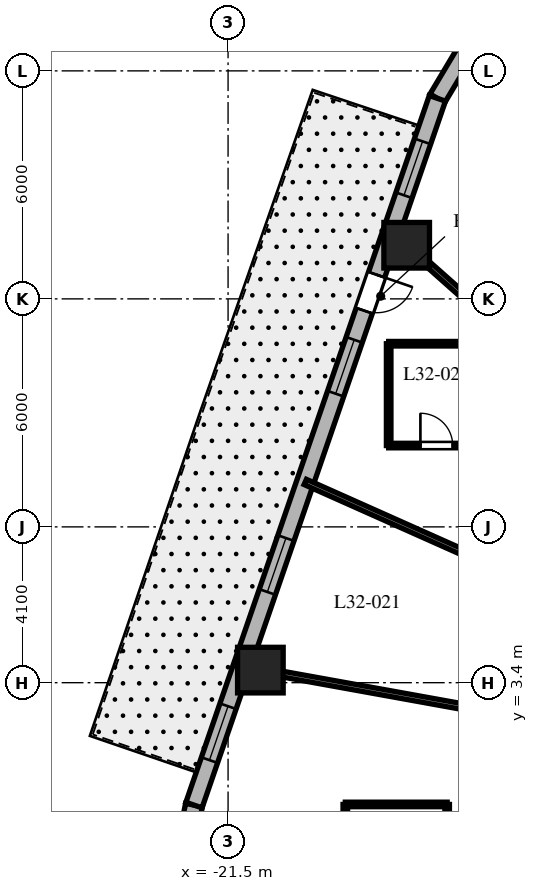
"""IFC4 building model, lengths in metres.
Left out: names, types, materials, properties, quantities, classifications, styles, units other than length and angle.
Written with IfcOpenShell. Run it as: python <this file> out.ifc"""

import sys

from ifc_helpers import new_model, si_unit, direction, frame, frame_2d, origin, origin_2d, place, context, subcontext, project, spatial, rectangle, extrude, element, fill, save


model = new_model("IFC4")
c1 = context("Model", 3, precision=1e-05, world=origin(), true_north=direction((0.0, 1.0)))
c2 = subcontext(c1, "Body", "Model", "MODEL_VIEW")
j1 = project(units=[si_unit("LENGTHUNIT", "METRE"), si_unit("PLANEANGLEUNIT", "RADIAN")], contexts=[c1])
p1 = place(None, origin())
s1 = spatial("IfcSite", under=j1, at=p1, CompositionType="ELEMENT")
p2 = place(p1, origin())
s2 = spatial("IfcBuilding", under=s1, at=p2, CompositionType="ELEMENT")
p3 = place(p2, frame((0.0, 0.0, 132.1)))
s3 = spatial("IfcBuildingStorey", under=s2, at=p3, CompositionType="ELEMENT", Elevation=132.1)
for number, where, z_axis, x_axis in (
    (1, (-16.8, 14.911, 0.0), (0.0, 0.0, 1.0), (1.0, 0.0, 0.0)),
    (2, (-20.65, 3.731, 0.0), (0.0, 0.0, 1.0), (1.0, 0.0, 0.0)),
):
    element("IfcColumn", number, at=place(p3, frame(where, z_axis=z_axis, x_axis=x_axis)), inside=s3, PredefinedType="COLUMN", context=c2, shape_type="SweptSolid", body=[
        extrude(rectangle(XDim=1.2, YDim=1.2, at=origin_2d()), origin(), (0.0, 0.0, 1.0), 3.7),
    ])
p4 = place(p3, frame((-15.272, 19.984, 0.0), z_axis=(0.0, 0.0, 1.0), x_axis=(-0.512579347361, -0.858639862025, 0.0)))
e3 = element("IfcWall", 3, at=p4, inside=s3, PredefinedType="SOLIDWALL", context=c2, shape_type="SweptSolid", body=[
    extrude(rectangle(XDim=1.406, YDim=0.45, at=frame_2d((0.703, 0.0))), origin(), (0.0, 0.0, 1.0), 3.4),
])
p5 = place(p3, frame((-22.397, 0.179, 0.0), z_axis=(0.0, 0.0, 1.0), x_axis=(-0.199313589404, -0.979935759669, 0.0)))
e4 = element("IfcWall", 4, at=p5, inside=s3, PredefinedType="SOLIDWALL", context=c2, shape_type="SweptSolid", body=[
    extrude(rectangle(XDim=0.896, YDim=0.45, at=frame_2d((0.448, 0.0))), origin(), (0.0, 0.0, 1.0), 3.4),
])
p6 = place(p3, frame((-15.992, 18.777, 0.0), z_axis=(0.0, 0.0, 1.0), x_axis=(-0.325606988926, -0.945505202927, 0.0)))
e5 = element("IfcWall", 5, at=p6, inside=s3, PredefinedType="SOLIDWALL", context=c2, shape_type="SweptSolid", body=[
    extrude(rectangle(XDim=19.669, YDim=0.45, at=frame_2d((9.835, 0.0))), origin(), (0.0, 0.0, 1.0), 3.4),
])
p7 = place(p6, frame((4.909, 0.0, 0.0)))
e6 = element("IfcOpeningElement", 6, at=p7, cuts=e5, PredefinedType="OPENING", context=c2, shape_type="SweptSolid", body=[
    extrude(rectangle(XDim=1.0, YDim=2.15, at=frame_2d((0.5, 1.075))), frame((0.0, 0.235, 0.0), z_axis=(0.0, -1.0, 0.0), x_axis=(1.0, 0.0, 0.0)), (0.0, 0.0, 1.0), 0.47),
])
p8 = place(p6, frame((1.197, 0.0, 0.8)))
e7 = element("IfcOpeningElement", 7, at=p8, cuts=e5, PredefinedType="OPENING", context=c2, shape_type="SweptSolid", body=[
    extrude(rectangle(XDim=1.5, YDim=1.8, at=frame_2d((0.75, 0.9))), frame((0.0, 0.235, 0.0), z_axis=(0.0, -1.0, 0.0), x_axis=(1.0, 0.0, 0.0)), (0.0, 0.0, 1.0), 0.47),
])
p9 = place(p6, frame((6.72, 0.0, 0.8)))
e8 = element("IfcOpeningElement", 8, at=p9, cuts=e5, PredefinedType="OPENING", context=c2, shape_type="SweptSolid", body=[
    extrude(rectangle(XDim=1.5, YDim=1.8, at=frame_2d((0.75, 0.9))), frame((0.0, 0.235, 0.0), z_axis=(0.0, -1.0, 0.0), x_axis=(1.0, 0.0, 0.0)), (0.0, 0.0, 1.0), 0.47),
])
p10 = place(p6, frame((12.238, 0.0, 0.8)))
e9 = element("IfcOpeningElement", 9, at=p10, cuts=e5, PredefinedType="OPENING", context=c2, shape_type="SweptSolid", body=[
    extrude(rectangle(XDim=1.5, YDim=1.8, at=frame_2d((0.75, 0.9))), frame((0.0, 0.235, 0.0), z_axis=(0.0, -1.0, 0.0), x_axis=(1.0, 0.0, 0.0)), (0.0, 0.0, 1.0), 0.47),
])
p11 = place(p6, frame((16.918, 0.0, 0.8)))
e10 = element("IfcOpeningElement", 10, at=p11, cuts=e5, PredefinedType="OPENING", context=c2, shape_type="SweptSolid", body=[
    extrude(rectangle(XDim=1.5, YDim=1.8, at=frame_2d((0.75, 0.9))), frame((0.0, 0.235, 0.0), z_axis=(0.0, -1.0, 0.0), x_axis=(1.0, 0.0, 0.0)), (0.0, 0.0, 1.0), 0.47),
])
p12 = place(p3, frame((-11.098, 9.85, 0.0), z_axis=(0.0, 0.0, 1.0), x_axis=(-0.747904295103, 0.663806572253, 0.0)))
e11 = element("IfcWall", 11, at=p12, inside=s3, PredefinedType="PARTITIONING", context=c2, shape_type="SweptSolid", body=[
    extrude(rectangle(XDim=8.16, YDim=0.15, at=frame_2d((4.08, 0.0))), origin(), (0.0, 0.0, 1.0), 2.54),
])
p13 = place(p3, frame((-11.35, 5.062, 0.0), z_axis=(0.0, 0.0, 1.0), x_axis=(-0.91329663997, 0.407295037312, 0.0)))
e12 = element("IfcWall", 12, at=p13, inside=s3, PredefinedType="PARTITIONING", context=c2, shape_type="SweptSolid", body=[
    extrude(rectangle(XDim=8.889, YDim=0.15, at=frame_2d((4.445, 0.0))), origin(), (0.0, 0.0, 1.0), 2.54),
])
p14 = place(p3, frame((-11.35, 2.051, 0.0), z_axis=(0.0, 0.0, 1.0), x_axis=(-0.984068313063, 0.177790762484, 0.0)))
e13 = element("IfcWall", 13, at=p14, inside=s3, PredefinedType="PARTITIONING", context=c2, shape_type="SweptSolid", body=[
    extrude(rectangle(XDim=9.951, YDim=0.15, at=frame_2d((4.976, 0.0))), origin(), (0.0, 0.0, 1.0), 2.54),
])
p15 = place(p3, frame((-17.274, 9.64, 0.0), z_axis=(0.0, 0.0, 1.0), x_axis=(1.0, 0.0, 0.0)))
e14 = element("IfcWall", 14, at=p15, inside=s3, PredefinedType="PARTITIONING", context=c2, shape_type="SweptSolid", body=[
    extrude(rectangle(XDim=2.52, YDim=0.12, at=frame_2d((1.26, 0.0))), origin(), (0.0, 0.0, 1.0), 2.972),
])
p16 = place(p15, frame((0.835, 0.0, 0.0)))
e15 = element("IfcOpeningElement", 15, at=p16, cuts=e14, PredefinedType="OPENING", context=c2, shape_type="SweptSolid", body=[
    extrude(rectangle(XDim=0.85, YDim=2.03, at=frame_2d((0.425, 1.015))), frame((0.0, 0.07, 0.0), z_axis=(0.0, -1.0, 0.0), x_axis=(1.0, 0.0, 0.0)), (0.0, 0.0, 1.0), 0.14),
])
p17 = place(p3, frame((-14.754, 12.32, 0.0), z_axis=(0.0, 0.0, 1.0), x_axis=(-1.0, 0.0, 0.0)))
e16 = element("IfcWall", 16, at=p17, inside=s3, PredefinedType="PARTITIONING", context=c2, shape_type="SweptSolid", body=[
    extrude(rectangle(XDim=2.52, YDim=0.12, at=frame_2d((1.26, 0.0))), origin(), (0.0, 0.0, 1.0), 3.4),
])
p18 = place(p3, frame((-17.274, 12.32, 0.0), z_axis=(0.0, 0.0, 1.0), x_axis=(0.0, -1.0, 0.0)))
e17 = element("IfcWall", 17, at=p18, inside=s3, PredefinedType="PARTITIONING", context=c2, shape_type="SweptSolid", body=[
    extrude(rectangle(XDim=2.68, YDim=0.12, at=frame_2d((1.34, 0.0))), origin(), (0.0, 0.0, 1.0), 3.4),
])
p19 = place(p3, frame((-15.735, -2.344, 0.0), z_axis=(0.0, 0.0, 1.0), x_axis=(0.0, 1.0, 0.0)))
e18 = element("IfcWall", 18, at=p19, inside=s3, PredefinedType="PARTITIONING", context=c2, shape_type="SweptSolid", body=[
    extrude(rectangle(XDim=2.54, YDim=0.12, at=frame_2d((1.27, 0.0))), origin(), (0.0, 0.0, 1.0), 3.4),
])
p20 = place(p3, frame((-15.735, 0.196, 0.0), z_axis=(0.0, 0.0, 1.0), x_axis=(-1.0, 0.0, 0.0)))
e19 = element("IfcWall", 19, at=p20, inside=s3, PredefinedType="PARTITIONING", context=c2, shape_type="SweptSolid", body=[
    extrude(rectangle(XDim=2.68, YDim=0.12, at=frame_2d((1.34, 0.0))), origin(), (0.0, 0.0, 1.0), 2.84),
])
p21 = place(p3, frame((-18.415, 0.196, 0.0), z_axis=(0.0, 0.0, 1.0), x_axis=(0.0, -1.0, 0.0)))
e20 = element("IfcWall", 20, at=p21, inside=s3, PredefinedType="PARTITIONING", context=c2, shape_type="SweptSolid", body=[
    extrude(rectangle(XDim=2.54, YDim=0.12, at=frame_2d((1.27, 0.0))), origin(), (0.0, 0.0, 1.0), 3.4),
])
p22 = place(p7, origin())
e21 = element("IfcDoor", 21, at=p22, inside=s3, OperationType="SINGLE_SWING_LEFT", PredefinedType="DOOR", context=c2, shape_type="SweptSolid", body=[
    extrude(rectangle(XDim=1.0, YDim=2.15, at=frame_2d((0.5, 1.075))), frame((0.0, 0.025, 0.0), z_axis=(0.0, -1.0, 0.0), x_axis=(1.0, 0.0, 0.0)), (0.0, 0.0, 1.0), 0.05),
])
fill(e6, e21)
p23 = place(p8, origin())
e22 = element("IfcWindow", 22, at=p23, inside=s3, PartitioningType="SINGLE_PANEL", PredefinedType="WINDOW", context=c2, shape_type="SweptSolid", body=[
    extrude(rectangle(XDim=1.5, YDim=1.8, at=frame_2d((0.75, 0.9))), frame((0.0, 0.03, 0.0), z_axis=(0.0, -1.0, 0.0), x_axis=(1.0, 0.0, 0.0)), (0.0, 0.0, 1.0), 0.06),
])
fill(e7, e22)
p24 = place(p9, origin())
e23 = element("IfcWindow", 23, at=p24, inside=s3, PartitioningType="SINGLE_PANEL", PredefinedType="WINDOW", context=c2, shape_type="SweptSolid", body=[
    extrude(rectangle(XDim=1.5, YDim=1.8, at=frame_2d((0.75, 0.9))), frame((0.0, 0.03, 0.0), z_axis=(0.0, -1.0, 0.0), x_axis=(1.0, 0.0, 0.0)), (0.0, 0.0, 1.0), 0.06),
])
fill(e8, e23)
p25 = place(p10, origin())
e24 = element("IfcWindow", 24, at=p25, inside=s3, PartitioningType="SINGLE_PANEL", PredefinedType="WINDOW", context=c2, shape_type="SweptSolid", body=[
    extrude(rectangle(XDim=1.5, YDim=1.8, at=frame_2d((0.75, 0.9))), frame((0.0, 0.03, 0.0), z_axis=(0.0, -1.0, 0.0), x_axis=(1.0, 0.0, 0.0)), (0.0, 0.0, 1.0), 0.06),
])
fill(e9, e24)
p26 = place(p11, origin())
e25 = element("IfcWindow", 25, at=p26, inside=s3, PartitioningType="SINGLE_PANEL", PredefinedType="WINDOW", context=c2, shape_type="SweptSolid", body=[
    extrude(rectangle(XDim=1.5, YDim=1.8, at=frame_2d((0.75, 0.9))), frame((0.0, 0.03, 0.0), z_axis=(0.0, -1.0, 0.0), x_axis=(1.0, 0.0, 0.0)), (0.0, 0.0, 1.0), 0.06),
])
fill(e10, e25)
p27 = place(p16, origin())
e26 = element("IfcDoor", 26, at=p27, inside=s3, OperationType="SINGLE_SWING_LEFT", PredefinedType="DOOR", context=c2, shape_type="SweptSolid", body=[
    extrude(rectangle(XDim=0.85, YDim=2.03, at=frame_2d((0.425, 1.015))), frame((0.0, 0.025, 0.0), z_axis=(0.0, -1.0, 0.0), x_axis=(1.0, 0.0, 0.0)), (0.0, 0.0, 1.0), 0.05),
])
fill(e15, e26)
save(model, sys.argv[1])
